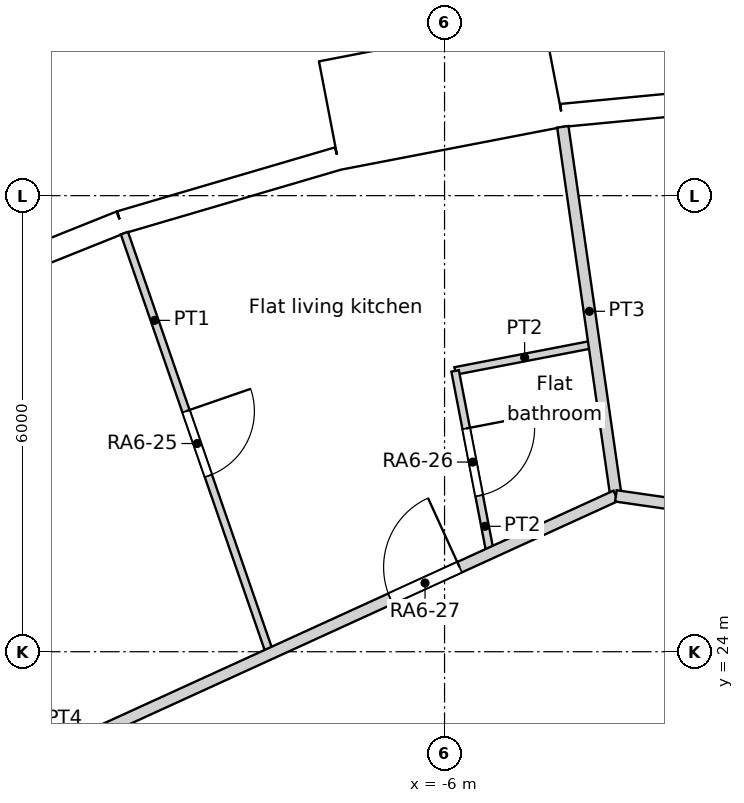
"""IFC4 building model, lengths in metres.
Left out: names, types, materials, properties, quantities, classifications, styles, units other than length and angle.
Written with IfcOpenShell. Run it as: python <this file> out.ifc"""

import sys

from ifc_helpers import new_model, si_unit, direction, frame, frame_2d, origin, origin_2d, place, context, subcontext, project, spatial, rectangle, circle, extrude, element, fill, save


model = new_model("IFC4")
c1 = context("Model", 3, precision=1e-05, world=origin(), true_north=direction((0.0, 1.0)))
c2 = subcontext(c1, "Body", "Model", "MODEL_VIEW")
j1 = project(units=[si_unit("LENGTHUNIT", "METRE"), si_unit("PLANEANGLEUNIT", "RADIAN")], contexts=[c1])
p1 = place(None, origin())
s1 = spatial("IfcSite", under=j1, at=p1, CompositionType="ELEMENT")
p2 = place(p1, origin())
s2 = spatial("IfcBuilding", under=s1, at=p2, CompositionType="ELEMENT")
p3 = place(p2, frame((0.0, 0.0, 82.2)))
s3 = spatial("IfcBuildingStorey", under=s2, at=p3, CompositionType="ELEMENT", Elevation=82.2)
for number, where, z_axis, x_axis in (
    (1, (-4.309, 29.966, 0.0), (0.0, 0.0, 1.0), (1.0, 0.0, 0.0)),
    (2, (-9.902, 28.61, 0.0), (0.0, 0.0, 1.0), (1.0, 0.0, 0.0)),
):
    element("IfcColumn", number, at=place(p3, frame(where, z_axis=z_axis, x_axis=x_axis)), inside=s3, PredefinedType="COLUMN", context=c2, shape_type="SweptSolid", body=[
        extrude(circle(Radius=0.6, at=origin_2d()), origin(), (0.0, 0.0, 1.0), 3.6),
    ])
p4 = place(p3, frame((-7.04, 23.516, 0.0), z_axis=(0.0, 0.0, 1.0), x_axis=(1.0, 0.0, 0.0)))
e3 = element("IfcColumn", 3, at=p4, inside=s3, PredefinedType="COLUMN", context=c2, shape_type="SweptSolid", body=[
    extrude(circle(Radius=0.65, at=origin_2d()), origin(), (0.0, 0.0, 1.0), 3.6),
])
p5 = place(p3, frame((-1.493, 31.339, 0.0), z_axis=(0.0, 0.0, 1.0), x_axis=(-0.995472611385, -0.095048829468, 0.0)))
e4 = element("IfcWall", 4, at=p5, inside=s3, PredefinedType="SOLIDWALL", context=c2, shape_type="SweptSolid", body=[
    extrude(rectangle(XDim=2.979, YDim=0.3, at=frame_2d((1.49, 0.0))), origin(), (0.0, 0.0, 1.0), 3.15),
])
p6 = place(p5, frame((1.49, 0.0, 1.55)))
e5 = element("IfcOpeningElement", 5, at=p6, cuts=e4, PredefinedType="OPENING", context=c2, shape_type="SweptSolid", body=[
    extrude(circle(Radius=0.9, at=origin_2d()), frame((0.0, 0.16, 0.0), z_axis=(0.0, -1.0, 0.0), x_axis=(1.0, 0.0, 0.0)), (0.0, 0.0, 1.0), 0.32),
])
p7 = place(p3, frame((-4.567, 31.621, -0.45), z_axis=(0.0, 0.0, 1.0), x_axis=(-0.981921602273, -0.189288052949, 0.0)))
e6 = element("IfcWall", 6, at=p7, inside=s3, PredefinedType="ELEMENTEDWALL", context=c2, shape_type="SweptSolid", body=[
    extrude(rectangle(XDim=3.0, YDim=1.45, at=frame_2d((1.5, 0.0))), origin(), (0.0, 0.0, 1.0), 3.6),
])
p8 = place(p7, frame((1.5, 0.0, 2.0)))
e7 = element("IfcOpeningElement", 7, at=p8, cuts=e6, PredefinedType="OPENING", context=c2, shape_type="SweptSolid", body=[
    extrude(circle(Radius=0.9, at=origin_2d()), frame((0.0, 0.735, 0.0), z_axis=(0.0, -1.0, 0.0), x_axis=(1.0, 0.0, 0.0)), (0.0, 0.0, 1.0), 1.47),
])
p9 = place(p3, frame((-7.403, 30.488, 0.0), z_axis=(0.0, 0.0, 1.0), x_axis=(-0.959501085144, -0.281704930036, 0.0)))
e8 = element("IfcWall", 8, at=p9, inside=s3, PredefinedType="SOLIDWALL", context=c2, shape_type="SweptSolid", body=[
    extrude(rectangle(XDim=2.979, YDim=0.3, at=frame_2d((1.49, 0.0))), origin(), (0.0, 0.0, 1.0), 3.15),
])
p10 = place(p9, frame((1.49, 0.0, 1.55)))
e9 = element("IfcOpeningElement", 9, at=p10, cuts=e8, PredefinedType="OPENING", context=c2, shape_type="SweptSolid", body=[
    extrude(circle(Radius=0.9, at=origin_2d()), frame((0.0, 0.16, 0.0), z_axis=(0.0, -1.0, 0.0), x_axis=(1.0, 0.0, 0.0)), (0.0, 0.0, 1.0), 0.32),
])
p11 = place(p3, frame((-10.261, 29.649, 0.0), z_axis=(0.0, 0.0, 1.0), x_axis=(-0.928374947, -0.371644935098, 0.0)))
e10 = element("IfcWall", 10, at=p11, inside=s3, PredefinedType="SOLIDWALL", context=c2, shape_type="SweptSolid", body=[
    extrude(rectangle(XDim=2.98, YDim=0.3, at=frame_2d((1.49, 0.0))), origin(), (0.0, 0.0, 1.0), 3.15),
])
p12 = place(p11, frame((1.49, 0.0, 1.55)))
e11 = element("IfcOpeningElement", 11, at=p12, cuts=e10, PredefinedType="OPENING", context=c2, shape_type="SweptSolid", body=[
    extrude(circle(Radius=0.9, at=origin_2d()), frame((0.0, 0.16, 0.0), z_axis=(0.0, -1.0, 0.0), x_axis=(1.0, 0.0, 0.0)), (0.0, 0.0, 1.0), 0.32),
])
p13 = place(p3, frame((-3.746, 26.05, 0.0), z_axis=(0.0, 0.0, 1.0), x_axis=(0.989832601965, -0.14223719657, 0.0)))
e12 = element("IfcWall", 12, at=p13, inside=s3, PredefinedType="PARTITIONING", context=c2, shape_type="SweptSolid", body=[
    extrude(rectangle(XDim=14.83, YDim=0.15, at=frame_2d((7.415, 0.0))), origin(), (0.0, 0.0, 1.0), 3.15),
])
p14 = place(p13, frame((6.054, 0.0, 0.0)))
e13 = element("IfcOpeningElement", 13, at=p14, cuts=e12, PredefinedType="OPENING", context=c2, shape_type="SweptSolid", body=[
    extrude(rectangle(XDim=1.0, YDim=2.1, at=frame_2d((0.5, 1.05))), frame((0.0, 0.075, 0.0), z_axis=(0.0, -1.0, 0.0), x_axis=(1.0, 0.0, 0.0)), (0.0, 0.0, 1.0), 0.15),
])
p15 = place(p3, frame((-17.236, 19.891, 0.0), z_axis=(0.0, 0.0, 1.0), x_axis=(0.909645678785, 0.415385049163, 0.0)))
e14 = element("IfcWall", 14, at=p15, inside=s3, PredefinedType="PARTITIONING", context=c2, shape_type="SweptSolid", body=[
    extrude(rectangle(XDim=14.829, YDim=0.15, at=frame_2d((7.415, 0.0))), origin(), (0.0, 0.0, 1.0), 3.15),
])
p16 = place(p15, frame((11.569, 0.0, 0.0)))
e15 = element("IfcOpeningElement", 15, at=p16, cuts=e14, PredefinedType="OPENING", context=c2, shape_type="SweptSolid", body=[
    extrude(rectangle(XDim=1.0, YDim=2.1, at=frame_2d((0.5, 1.05))), frame((0.0, 0.075, 0.0), z_axis=(0.0, -1.0, 0.0), x_axis=(1.0, 0.0, 0.0)), (0.0, 0.0, 1.0), 0.15),
])
p17 = place(p15, frame((1.134, 0.0, 0.0)))
e16 = element("IfcOpeningElement", 16, at=p17, cuts=e14, PredefinedType="OPENING", context=c2, shape_type="SweptSolid", body=[
    extrude(rectangle(XDim=1.0, YDim=2.1, at=frame_2d((0.5, 1.05))), frame((0.0, 0.075, 0.0), z_axis=(0.0, -1.0, 0.0), x_axis=(1.0, 0.0, 0.0)), (0.0, 0.0, 1.0), 0.15),
])
p18 = place(p3, frame((-4.444, 30.906, 0.0), z_axis=(0.0, 0.0, 1.0), x_axis=(0.142452592463, -0.989801626035, 0.0)))
e17 = element("IfcWall", 17, at=p18, inside=s3, PredefinedType="PARTITIONING", context=c2, shape_type="SweptSolid", body=[
    extrude(rectangle(XDim=4.905, YDim=0.15, at=frame_2d((2.453, 0.0))), origin(), (0.0, 0.0, 1.0), 3.15),
])
p19 = place(p3, frame((-10.212, 29.507, 0.0), z_axis=(0.0, 0.0, 1.0), x_axis=(0.32692444056, -0.94505048022, 0.0)))
e18 = element("IfcWall", 18, at=p19, inside=s3, PredefinedType="PARTITIONING", context=c2, shape_type="SweptSolid", body=[
    extrude(rectangle(XDim=5.857, YDim=0.1, at=frame_2d((2.928, 0.0))), origin(), (0.0, 0.0, 1.0), 3.15),
])
p20 = place(p19, frame((2.479, 0.0, 0.0)))
e19 = element("IfcOpeningElement", 19, at=p20, cuts=e18, PredefinedType="OPENING", context=c2, shape_type="SweptSolid", body=[
    extrude(rectangle(XDim=0.9, YDim=2.1, at=frame_2d((0.45, 1.05))), frame((0.0, 0.05, 0.0), z_axis=(0.0, -1.0, 0.0), x_axis=(1.0, 0.0, 0.0)), (0.0, 0.0, 1.0), 0.1),
])
p21 = place(p3, frame((-5.861, 27.694, 0.0), z_axis=(0.0, 0.0, 1.0), x_axis=(0.981879093558, 0.189508431565, 0.0)))
e20 = element("IfcWall", 20, at=p21, inside=s3, PredefinedType="PARTITIONING", context=c2, shape_type="SweptSolid", body=[
    extrude(rectangle(XDim=1.863, YDim=0.1, at=frame_2d((0.931, 0.0))), origin(), (0.0, 0.0, 1.0), 3.15),
])
p22 = place(p3, frame((-5.861, 27.694, 0.0), z_axis=(0.0, 0.0, 1.0), x_axis=(0.189229262293, -0.981932933704, 0.0)))
e21 = element("IfcWall", 21, at=p22, inside=s3, PredefinedType="PARTITIONING", context=c2, shape_type="SweptSolid", body=[
    extrude(rectangle(XDim=2.442, YDim=0.1, at=frame_2d((1.221, 0.0))), origin(), (0.0, 0.0, 1.0), 3.15),
])
p23 = place(p22, frame((0.771, 0.0, 0.0)))
e22 = element("IfcOpeningElement", 22, at=p23, cuts=e21, PredefinedType="OPENING", context=c2, shape_type="SweptSolid", body=[
    extrude(rectangle(XDim=0.9, YDim=2.0, at=frame_2d((0.45, 1.0))), frame((0.0, 0.05, 0.0), z_axis=(0.0, -1.0, 0.0), x_axis=(1.0, 0.0, 0.0)), (0.0, 0.0, 1.0), 0.1),
])
p24 = place(p6, origin())
e23 = element("IfcWindow", 23, at=p24, inside=s3, PartitioningType="SINGLE_PANEL", PredefinedType="WINDOW", context=c2, shape_type="SweptSolid", body=[
    extrude(circle(Radius=0.9, at=origin_2d()), frame((0.0, 0.12, 0.0), z_axis=(0.0, -1.0, 0.0), x_axis=(1.0, 0.0, 0.0)), (0.0, 0.0, 1.0), 0.1),
])
fill(e5, e23)
p25 = place(p8, origin())
e24 = element("IfcWindow", 24, at=p25, inside=s3, PartitioningType="SINGLE_PANEL", PredefinedType="WINDOW", context=c2, shape_type="SweptSolid", body=[
    extrude(circle(Radius=0.9, at=origin_2d()), frame((0.0, 0.695, 0.0), z_axis=(0.0, -1.0, 0.0), x_axis=(1.0, 0.0, 0.0)), (0.0, 0.0, 1.0), 0.1),
])
fill(e7, e24)
p26 = place(p10, origin())
e25 = element("IfcWindow", 25, at=p26, inside=s3, PartitioningType="SINGLE_PANEL", PredefinedType="WINDOW", context=c2, shape_type="SweptSolid", body=[
    extrude(circle(Radius=0.9, at=origin_2d()), frame((0.0, 0.12, 0.0), z_axis=(0.0, -1.0, 0.0), x_axis=(1.0, 0.0, 0.0)), (0.0, 0.0, 1.0), 0.1),
])
fill(e9, e25)
p27 = place(p12, origin())
e26 = element("IfcWindow", 26, at=p27, inside=s3, PartitioningType="SINGLE_PANEL", PredefinedType="WINDOW", context=c2, shape_type="SweptSolid", body=[
    extrude(circle(Radius=0.9, at=origin_2d()), frame((0.0, 0.12, 0.0), z_axis=(0.0, -1.0, 0.0), x_axis=(1.0, 0.0, 0.0)), (0.0, 0.0, 1.0), 0.1),
])
fill(e11, e26)
p28 = place(p20, origin())
e27 = element("IfcDoor", 27, at=p28, inside=s3, OperationType="SINGLE_SWING_LEFT", PredefinedType="DOOR", context=c2, shape_type="SweptSolid", body=[
    extrude(rectangle(XDim=0.9, YDim=2.1, at=frame_2d((0.45, 1.05))), frame((0.0, 0.025, 0.0), z_axis=(0.0, -1.0, 0.0), x_axis=(1.0, 0.0, 0.0)), (0.0, 0.0, 1.0), 0.05),
])
fill(e19, e27)
p29 = place(p23, origin())
e28 = element("IfcDoor", 28, at=p29, inside=s3, OperationType="SINGLE_SWING_LEFT", PredefinedType="DOOR", context=c2, shape_type="SweptSolid", body=[
    extrude(rectangle(XDim=0.9, YDim=2.0, at=frame_2d((0.45, 1.0))), frame((0.0, 0.025, 0.0), z_axis=(0.0, -1.0, 0.0), x_axis=(1.0, 0.0, 0.0)), (0.0, 0.0, 1.0), 0.05),
])
fill(e22, e28)
p30 = place(p16, origin())
e29 = element("IfcDoor", 29, at=p30, inside=s3, OperationType="SINGLE_SWING_RIGHT", PredefinedType="DOOR", context=c2, shape_type="SweptSolid", body=[
    extrude(rectangle(XDim=1.0, YDim=2.1, at=frame_2d((0.5, 1.05))), frame((0.0, 0.025, 0.0), z_axis=(0.0, -1.0, 0.0), x_axis=(1.0, 0.0, 0.0)), (0.0, 0.0, 1.0), 0.05),
])
fill(e15, e29)
save(model, sys.argv[1])
